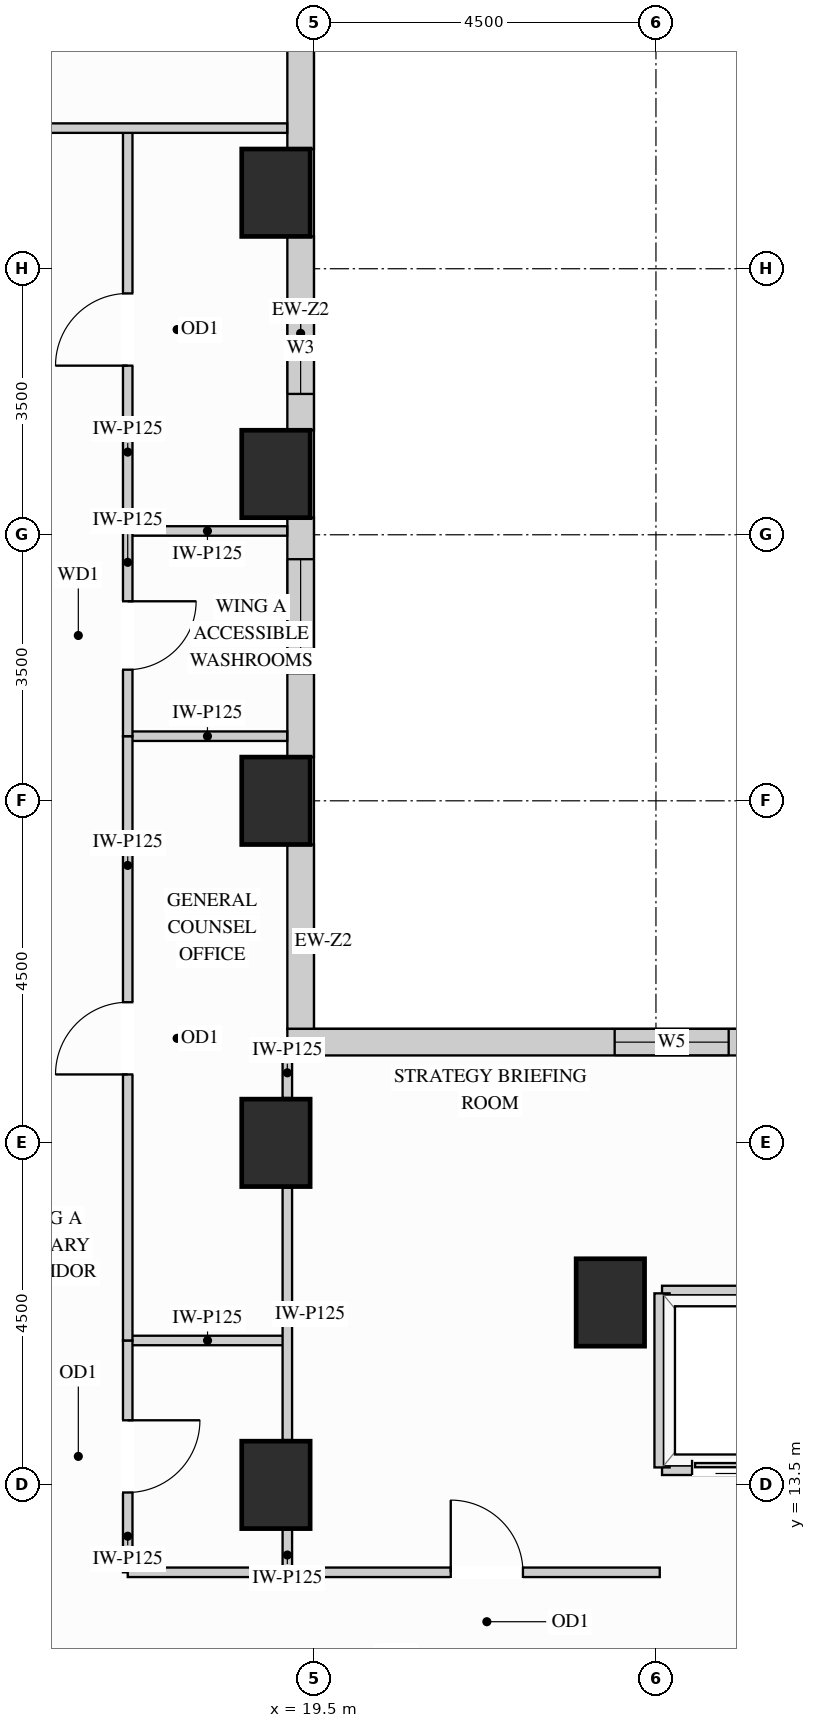
"""IFC4 building model, lengths in metres.
Left out: names, types, materials, properties, quantities, classifications, styles, units other than length and angle.
Written with IfcOpenShell. Run it as: python <this file> out.ifc"""

import sys

from ifc_helpers import new_model, si_unit, direction, frame, frame_2d, origin, origin_2d, place, context, subcontext, project, spatial, rectangle, extrude, source, transform, mapped, element, fill, save


model = new_model("IFC4")
c1 = context("Model", 3, precision=1e-05, world=origin(), true_north=direction((0.0, 1.0)))
c2 = subcontext(c1, "Body", "Model", "MODEL_VIEW")
j1 = project(units=[si_unit("LENGTHUNIT", "METRE"), si_unit("PLANEANGLEUNIT", "RADIAN")], contexts=[c1])
p1 = place(None, origin())
s1 = spatial("IfcSite", under=j1, at=p1, CompositionType="ELEMENT")
p2 = place(p1, origin())
s2 = spatial("IfcBuilding", under=s1, at=p2, CompositionType="ELEMENT")
p3 = place(p2, frame((0.0, 0.0, 88.2)))
s3 = spatial("IfcBuildingStorey", under=s2, at=p3, CompositionType="ELEMENT", Elevation=88.2)
m1 = source(origin(), c2, "Body", "SweptSolid", [
    extrude(rectangle(XDim=0.9, YDim=1.15, at=origin_2d()), origin(), (0.0, 0.0, 1.0), 3.38),
])
for number, where, z_axis, x_axis in (
    (1, (19.0, 13.5, 0.0), (0.0, 0.0, 1.0), (1.0, 0.0, 0.0)),
    (2, (19.0, 18.0, 0.0), (0.0, 0.0, 1.0), (1.0, 0.0, 0.0)),
    (3, (19.0, 22.5, 0.0), (0.0, 0.0, 1.0), (1.0, 0.0, 0.0)),
    (4, (19.0, 26.8, 0.0), (0.0, 0.0, 1.0), (1.0, 0.0, 0.0)),
    (5, (19.0, 30.5, 0.0), (0.0, 0.0, 1.0), (1.0, 0.0, 0.0)),
    (6, (23.4, 15.9, 0.0), (0.0, 0.0, 1.0), (1.0, 0.0, 0.0)),
):
    element("IfcColumn", number, at=place(p3, frame(where, z_axis=z_axis, x_axis=x_axis)), inside=s3, PredefinedType="COLUMN", context=c2, shape_type="MappedRepresentation", body=[
        mapped(m1, transform((0.0, 0.0, 0.0), x_axis=(1.0, 0.0, 0.0), y_axis=(0.0, 1.0, 0.0), z_axis=(0.0, 0.0, 1.0))),
    ])
m2 = source(origin(), c2, "Body", "SweptSolid", [
    extrude(rectangle(XDim=2.429, YDim=0.35, at=frame_2d((1.214, 0.0))), origin(), (0.0, 0.0, 1.0), 2.519),
])
p4 = place(p3, frame((19.325, 19.498, 0.0), z_axis=(0.0, 0.0, 1.0), x_axis=(0.0, 1.0, 0.0)))
e7 = element("IfcWall", 7, at=p4, inside=s3, PredefinedType="SOLIDWALL", context=c2, shape_type="MappedRepresentation", body=[
    mapped(m2, transform((0.0, 0.0, 0.0), x_axis=(1.0, 0.0, 0.0), y_axis=(0.0, 1.0, 0.0), z_axis=(0.0, 0.0, 1.0))),
])
p5 = place(p3, frame((19.325, 23.073, 0.0), z_axis=(0.0, 0.0, 1.0), x_axis=(0.0, 1.0, 0.0)))
e8 = element("IfcWall", 8, at=p5, inside=s3, PredefinedType="SOLIDWALL", context=c2, shape_type="SweptSolid", body=[
    extrude(rectangle(XDim=3.154, YDim=0.35, at=frame_2d((1.577, 0.0))), origin(), (0.0, 0.0, 1.0), 2.519),
])
p6 = place(p5, frame((1.105, 0.0, 0.78)))
e9 = element("IfcOpeningElement", 9, at=p6, cuts=e8, PredefinedType="OPENING", context=c2, shape_type="SweptSolid", body=[
    extrude(rectangle(XDim=1.5, YDim=1.559, at=frame_2d((0.75, 0.78))), frame((0.0, 0.185, 0.0), z_axis=(0.0, -1.0, 0.0), x_axis=(1.0, 0.0, 0.0)), (0.0, 0.0, 1.0), 0.37),
])
p7 = place(p3, frame((19.325, 27.373, 0.0), z_axis=(0.0, 0.0, 1.0), x_axis=(0.0, 1.0, 0.0)))
e10 = element("IfcWall", 10, at=p7, inside=s3, PredefinedType="SOLIDWALL", context=c2, shape_type="SweptSolid", body=[
    extrude(rectangle(XDim=2.554, YDim=0.35, at=frame_2d((1.277, 0.0))), origin(), (0.0, 0.0, 1.0), 2.519),
])
p8 = place(p7, frame((0.48, 0.0, 0.78)))
e11 = element("IfcOpeningElement", 11, at=p8, cuts=e10, PredefinedType="OPENING", context=c2, shape_type="SweptSolid", body=[
    extrude(rectangle(XDim=1.2, YDim=1.559, at=frame_2d((0.6, 0.78))), frame((0.0, 0.185, 0.0), z_axis=(0.0, -1.0, 0.0), x_axis=(1.0, 0.0, 0.0)), (0.0, 0.0, 1.0), 0.37),
])
m3 = source(origin(), c2, "Body", "SweptSolid", [
    extrude(rectangle(XDim=3.354, YDim=0.35, at=frame_2d((1.677, 0.0))), origin(), (0.0, 0.0, 1.0), 2.519),
])
p9 = place(p3, frame((19.325, 31.073, 0.0), z_axis=(0.0, 0.0, 1.0), x_axis=(0.0, 1.0, 0.0)))
e12 = element("IfcWall", 12, at=p9, inside=s3, PredefinedType="SOLIDWALL", context=c2, shape_type="MappedRepresentation", body=[
    mapped(m3, transform((0.0, 0.0, 0.0), x_axis=(1.0, 0.0, 0.0), y_axis=(0.0, 1.0, 0.0), z_axis=(0.0, 0.0, 1.0))),
])
p10 = place(p3, frame((34.75, 19.325, 0.0), z_axis=(0.0, 0.0, 1.0), x_axis=(-1.0, 0.0, 0.0)))
e13 = element("IfcWall", 13, at=p10, inside=s3, PredefinedType="SOLIDWALL", context=c2, shape_type="SweptSolid", body=[
    extrude(rectangle(XDim=15.6, YDim=0.35, at=frame_2d((7.8, 0.0))), origin(), (0.0, 0.0, 1.0), 3.365),
])
p11 = place(p10, frame((4.307, 0.0, 0.78)))
e14 = element("IfcOpeningElement", 14, at=p11, cuts=e13, PredefinedType="OPENING", context=c2, shape_type="SweptSolid", body=[
    extrude(rectangle(XDim=1.5, YDim=2.0, at=frame_2d((0.75, 1.0))), frame((0.0, 0.185, 0.0), z_axis=(0.0, -1.0, 0.0), x_axis=(1.0, 0.0, 0.0)), (0.0, 0.0, 1.0), 0.37),
])
p12 = place(p10, frame((9.793, 0.0, 0.78)))
e15 = element("IfcOpeningElement", 15, at=p12, cuts=e13, PredefinedType="OPENING", context=c2, shape_type="SweptSolid", body=[
    extrude(rectangle(XDim=1.5, YDim=2.0, at=frame_2d((0.75, 1.0))), frame((0.0, 0.185, 0.0), z_axis=(0.0, -1.0, 0.0), x_axis=(1.0, 0.0, 0.0)), (0.0, 0.0, 1.0), 0.37),
])
m4 = source(origin(), c2, "Body", "SweptSolid", [
    extrude(rectangle(XDim=2.1, YDim=0.125, at=frame_2d((1.05, 0.0))), origin(), (0.0, 0.0, 1.0), 3.365),
])
p13 = place(p3, frame((17.05, 15.4, 0.0), z_axis=(0.0, 0.0, 1.0), x_axis=(1.0, 0.0, 0.0)))
e16 = element("IfcWall", 16, at=p13, inside=s3, PredefinedType="PARTITIONING", context=c2, shape_type="MappedRepresentation", body=[
    mapped(m4, transform((0.0, 0.0, 0.0), x_axis=(1.0, 0.0, 0.0), y_axis=(0.0, 1.0, 0.0), z_axis=(0.0, 0.0, 1.0))),
])
m5 = source(origin(), c2, "Body", "SweptSolid", [
    extrude(rectangle(XDim=2.098, YDim=0.125, at=frame_2d((1.049, 0.0))), origin(), (0.0, 0.0, 1.0), 3.365),
])
for number, where, z_axis, x_axis in (
    (17, (17.05, 23.35, 0.0), (0.0, 0.0, 1.0), (1.0, 0.0, 0.0)),
    (18, (17.05, 26.05, 0.0), (0.0, 0.0, 1.0), (1.0, 0.0, 0.0)),
):
    element("IfcWall", number, at=place(p3, frame(where, z_axis=z_axis, x_axis=x_axis)), inside=s3, PredefinedType="PARTITIONING", context=c2, shape_type="MappedRepresentation", body=[
        mapped(m5, transform((0.0, 0.0, 0.0), x_axis=(1.0, 0.0, 0.0), y_axis=(0.0, 1.0, 0.0), z_axis=(0.0, 0.0, 1.0))),
    ])
m6 = source(origin(), c2, "Body", "SweptSolid", [
    extrude(rectangle(XDim=0.56, YDim=0.125, at=frame_2d((0.28, 0.0))), origin(), (0.0, 0.0, 1.0), 2.677),
])
p14 = place(p3, frame((19.15, 12.35, 0.0), z_axis=(0.0, 0.0, 1.0), x_axis=(0.0, 1.0, 0.0)))
e19 = element("IfcWall", 19, at=p14, inside=s3, PredefinedType="PARTITIONING", context=c2, shape_type="MappedRepresentation", body=[
    mapped(m6, transform((0.0, 0.0, 0.0), x_axis=(1.0, 0.0, 0.0), y_axis=(0.0, 1.0, 0.0), z_axis=(0.0, 0.0, 1.0))),
])
m7 = source(origin(), c2, "Body", "SweptSolid", [
    extrude(rectangle(XDim=3.32, YDim=0.125, at=frame_2d((1.66, 0.0))), origin(), (0.0, 0.0, 1.0), 2.677),
])
p15 = place(p3, frame((19.15, 14.09, 0.0), z_axis=(0.0, 0.0, 1.0), x_axis=(0.0, 1.0, 0.0)))
e20 = element("IfcWall", 20, at=p15, inside=s3, PredefinedType="PARTITIONING", context=c2, shape_type="MappedRepresentation", body=[
    mapped(m7, transform((0.0, 0.0, 0.0), x_axis=(1.0, 0.0, 0.0), y_axis=(0.0, 1.0, 0.0), z_axis=(0.0, 0.0, 1.0))),
])
m8 = source(origin(), c2, "Body", "SweptSolid", [
    extrude(rectangle(XDim=0.558, YDim=0.125, at=frame_2d((0.279, 0.0))), origin(), (0.0, 0.0, 1.0), 2.519),
])
p16 = place(p3, frame((19.15, 18.59, 0.0), z_axis=(0.0, 0.0, 1.0), x_axis=(0.0, 1.0, 0.0)))
e21 = element("IfcWall", 21, at=p16, inside=s3, PredefinedType="PARTITIONING", context=c2, shape_type="MappedRepresentation", body=[
    mapped(m8, transform((0.0, 0.0, 0.0), x_axis=(1.0, 0.0, 0.0), y_axis=(0.0, 1.0, 0.0), z_axis=(0.0, 0.0, 1.0))),
])
p17 = place(p3, frame((17.05, 12.35, 0.0), z_axis=(0.0, 0.0, 1.0), x_axis=(0.0, 1.0, 0.0)))
e22 = element("IfcWall", 22, at=p17, inside=s3, PredefinedType="PARTITIONING", context=c2, shape_type="SweptSolid", body=[
    extrude(rectangle(XDim=3.05, YDim=0.125, at=frame_2d((1.525, 0.0))), origin(), (0.0, 0.0, 1.0), 3.365),
])
p18 = place(p17, frame((1.05, 0.0, 0.0)))
e23 = element("IfcOpeningElement", 23, at=p18, cuts=e22, PredefinedType="OPENING", context=c2, shape_type="SweptSolid", body=[
    extrude(rectangle(XDim=0.95, YDim=2.15, at=frame_2d((0.475, 1.075))), frame((0.0, 0.073, 0.0), z_axis=(0.0, -1.0, 0.0), x_axis=(1.0, 0.0, 0.0)), (0.0, 0.0, 1.0), 0.145),
])
p19 = place(p3, frame((17.05, 15.4, 0.0), z_axis=(0.0, 0.0, 1.0), x_axis=(0.0, 1.0, 0.0)))
e24 = element("IfcWall", 24, at=p19, inside=s3, PredefinedType="PARTITIONING", context=c2, shape_type="SweptSolid", body=[
    extrude(rectangle(XDim=7.95, YDim=0.125, at=frame_2d((3.975, 0.0))), origin(), (0.0, 0.0, 1.0), 3.365),
])
p20 = place(p19, frame((3.5, 0.0, 0.0)))
e25 = element("IfcOpeningElement", 25, at=p20, cuts=e24, PredefinedType="OPENING", context=c2, shape_type="SweptSolid", body=[
    extrude(rectangle(XDim=0.95, YDim=2.15, at=frame_2d((0.475, 1.075))), frame((0.0, 0.073, 0.0), z_axis=(0.0, -1.0, 0.0), x_axis=(1.0, 0.0, 0.0)), (0.0, 0.0, 1.0), 0.145),
])
p21 = place(p3, frame((17.05, 26.05, 0.0), z_axis=(0.0, 0.0, 1.0), x_axis=(0.0, 1.0, 0.0)))
e26 = element("IfcWall", 26, at=p21, inside=s3, PredefinedType="PARTITIONING", context=c2, shape_type="SweptSolid", body=[
    extrude(rectangle(XDim=5.3, YDim=0.125, at=frame_2d((2.65, 0.0))), origin(), (0.0, 0.0, 1.0), 3.365),
])
p22 = place(p21, frame((2.175, 0.0, 0.0)))
e27 = element("IfcOpeningElement", 27, at=p22, cuts=e26, PredefinedType="OPENING", context=c2, shape_type="SweptSolid", body=[
    extrude(rectangle(XDim=0.95, YDim=2.15, at=frame_2d((0.475, 1.075))), frame((0.0, 0.073, 0.0), z_axis=(0.0, -1.0, 0.0), x_axis=(1.0, 0.0, 0.0)), (0.0, 0.0, 1.0), 0.145),
])
p23 = place(p3, frame((17.05, 23.35, 0.0), z_axis=(0.0, 0.0, 1.0), x_axis=(0.0, 1.0, 0.0)))
e28 = element("IfcWall", 28, at=p23, inside=s3, PredefinedType="PARTITIONING", context=c2, shape_type="SweptSolid", body=[
    extrude(rectangle(XDim=2.7, YDim=0.125, at=frame_2d((1.35, 0.0))), origin(), (0.0, 0.0, 1.0), 3.365),
])
p24 = place(p23, frame((0.875, 0.0, 0.0)))
e29 = element("IfcOpeningElement", 29, at=p24, cuts=e28, PredefinedType="OPENING", context=c2, shape_type="SweptSolid", body=[
    extrude(rectangle(XDim=0.9, YDim=2.15, at=frame_2d((0.45, 1.075))), frame((0.0, 0.073, 0.0), z_axis=(0.0, -1.0, 0.0), x_axis=(1.0, 0.0, 0.0)), (0.0, 0.0, 1.0), 0.145),
])
m9 = source(origin(), c2, "Body", "SweptSolid", [
    extrude(rectangle(XDim=5.798, YDim=0.125, at=frame_2d((2.899, 0.0))), origin(), (0.0, 0.0, 1.0), 3.365),
])
p25 = place(p3, frame((13.35, 31.35, 0.0), z_axis=(0.0, 0.0, 1.0), x_axis=(1.0, 0.0, 0.0)))
e30 = element("IfcWall", 30, at=p25, inside=s3, PredefinedType="PARTITIONING", context=c2, shape_type="MappedRepresentation", body=[
    mapped(m9, transform((0.0, 0.0, 0.0), x_axis=(1.0, 0.0, 0.0), y_axis=(0.0, 1.0, 0.0), z_axis=(0.0, 0.0, 1.0))),
])
m10 = source(origin(), c2, "Body", "SweptSolid", [
    extrude(rectangle(XDim=2.45, YDim=0.125, at=frame_2d((1.225, 0.0))), origin(), (0.0, 0.0, 1.0), 3.365),
])
p26 = place(p3, frame((17.05, 12.35, 0.0), z_axis=(0.0, 0.0, 1.0), x_axis=(1.0, 0.0, 0.0)))
e31 = element("IfcWall", 31, at=p26, inside=s3, PredefinedType="PARTITIONING", context=c2, shape_type="MappedRepresentation", body=[
    mapped(m10, transform((0.0, 0.0, 0.0), x_axis=(1.0, 0.0, 0.0), y_axis=(0.0, 1.0, 0.0), z_axis=(0.0, 0.0, 1.0))),
])
p27 = place(p3, frame((19.5, 12.35, 0.0), z_axis=(0.0, 0.0, 1.0), x_axis=(1.0, 0.0, 0.0)))
e32 = element("IfcWall", 32, at=p27, inside=s3, PredefinedType="PARTITIONING", context=c2, shape_type="SweptSolid", body=[
    extrude(rectangle(XDim=4.55, YDim=0.125, at=frame_2d((2.275, 0.0))), origin(), (0.0, 0.0, 1.0), 3.365),
])
p28 = place(p27, frame((1.8, 0.0, 0.0)))
e33 = element("IfcOpeningElement", 33, at=p28, cuts=e32, PredefinedType="OPENING", context=c2, shape_type="SweptSolid", body=[
    extrude(rectangle(XDim=0.95, YDim=2.15, at=frame_2d((0.475, 1.075))), frame((0.0, 0.073, 0.0), z_axis=(0.0, -1.0, 0.0), x_axis=(1.0, 0.0, 0.0)), (0.0, 0.0, 1.0), 0.145),
])
m11 = source(origin(), c2, "Body", "SweptSolid", [
    extrude(rectangle(XDim=1.89, YDim=0.2, at=frame_2d((0.945, 0.0))), origin(), (0.0, 0.0, 1.0), 2.677),
])
p29 = place(p3, frame((24.08, 16.02, 0.0), z_axis=(0.0, 0.0, 1.0), x_axis=(1.0, 0.0, 0.0)))
e34 = element("IfcWall", 34, at=p29, inside=s3, PredefinedType="PARTITIONING", context=c2, shape_type="MappedRepresentation", body=[
    mapped(m11, transform((0.0, 0.0, 0.0), x_axis=(1.0, 0.0, 0.0), y_axis=(0.0, 1.0, 0.0), z_axis=(0.0, 0.0, 1.0))),
])
p30 = place(p3, frame((24.08, 13.73, 0.0), z_axis=(0.0, 0.0, 1.0), x_axis=(1.0, 0.0, 0.0)))
e35 = element("IfcWall", 35, at=p30, inside=s3, PredefinedType="PARTITIONING", context=c2, shape_type="SweptSolid", body=[
    extrude(rectangle(XDim=1.89, YDim=0.2, at=frame_2d((0.945, 0.0))), origin(), (0.0, 0.0, 1.0), 2.446),
])
p31 = place(p30, frame((0.395, 0.0, 0.0)))
e36 = element("IfcOpeningElement", 36, at=p31, cuts=e35, PredefinedType="OPENING", context=c2, shape_type="SweptSolid", body=[
    extrude(rectangle(XDim=1.1, YDim=2.2, at=frame_2d((0.55, 1.1))), frame((0.0, 0.11, 0.0), z_axis=(0.0, -1.0, 0.0), x_axis=(1.0, 0.0, 0.0)), (0.0, 0.0, 1.0), 0.22),
])
m12 = source(origin(), c2, "Body", "SweptSolid", [
    extrude(rectangle(XDim=2.29, YDim=0.2, at=frame_2d((1.145, 0.0))), origin(), (0.0, 0.0, 1.0), 3.365),
])
p32 = place(p3, frame((24.08, 13.73, 0.0), z_axis=(0.0, 0.0, 1.0), x_axis=(0.0, 1.0, 0.0)))
e37 = element("IfcWall", 37, at=p32, inside=s3, PredefinedType="PARTITIONING", context=c2, shape_type="MappedRepresentation", body=[
    mapped(m12, transform((0.0, 0.0, 0.0), x_axis=(1.0, 0.0, 0.0), y_axis=(0.0, 1.0, 0.0), z_axis=(0.0, 0.0, 1.0))),
])
m13 = source(origin(), c2, "Body", "SweptSolid", [
    extrude(rectangle(XDim=1.1, YDim=2.2, at=frame_2d((0.55, 1.1))), frame((0.0, 0.025, 0.0), z_axis=(0.0, -1.0, 0.0), x_axis=(1.0, 0.0, 0.0)), (0.0, 0.0, 1.0), 0.05),
])
p33 = place(p31, origin())
e38 = element("IfcDoor", 38, at=p33, inside=s3, OperationType="SLIDING_TO_LEFT", PredefinedType="DOOR", context=c2, shape_type="MappedRepresentation", body=[
    mapped(m13, transform((0.0, 0.0, 0.0), x_axis=(1.0, 0.0, 0.0), y_axis=(0.0, 1.0, 0.0), z_axis=(0.0, 0.0, 1.0))),
])
fill(e36, e38)
m14 = source(origin(), c2, "Body", "SweptSolid", [
    extrude(rectangle(XDim=0.95, YDim=2.15, at=frame_2d((0.475, 1.075))), frame((0.0, 0.025, 0.0), z_axis=(0.0, -1.0, 0.0), x_axis=(1.0, 0.0, 0.0)), (0.0, 0.0, 1.0), 0.05),
])
p34 = place(p18, origin())
e39 = element("IfcDoor", 39, at=p34, inside=s3, OperationType="SINGLE_SWING_RIGHT", PredefinedType="DOOR", context=c2, shape_type="MappedRepresentation", body=[
    mapped(m14, transform((0.0, 0.0, 0.0), x_axis=(1.0, 0.0, 0.0), y_axis=(0.0, 1.0, 0.0), z_axis=(0.0, 0.0, 1.0))),
])
fill(e23, e39)
p35 = place(p20, origin())
e40 = element("IfcDoor", 40, at=p35, inside=s3, OperationType="SINGLE_SWING_LEFT", PredefinedType="DOOR", context=c2, shape_type="MappedRepresentation", body=[
    mapped(m14, transform((0.0, 0.0, 0.0), x_axis=(1.0, 0.0, 0.0), y_axis=(0.0, 1.0, 0.0), z_axis=(0.0, 0.0, 1.0))),
])
fill(e25, e40)
p36 = place(p22, origin())
e41 = element("IfcDoor", 41, at=p36, inside=s3, OperationType="SINGLE_SWING_LEFT", PredefinedType="DOOR", context=c2, shape_type="MappedRepresentation", body=[
    mapped(m14, transform((0.0, 0.0, 0.0), x_axis=(1.0, 0.0, 0.0), y_axis=(0.0, 1.0, 0.0), z_axis=(0.0, 0.0, 1.0))),
])
fill(e27, e41)
p37 = place(p28, origin())
e42 = element("IfcDoor", 42, at=p37, inside=s3, OperationType="SINGLE_SWING_LEFT", PredefinedType="DOOR", context=c2, shape_type="MappedRepresentation", body=[
    mapped(m14, transform((0.0, 0.0, 0.0), x_axis=(1.0, 0.0, 0.0), y_axis=(0.0, 1.0, 0.0), z_axis=(0.0, 0.0, 1.0))),
])
fill(e33, e42)
m15 = source(origin(), c2, "Body", "SweptSolid", [
    extrude(rectangle(XDim=0.9, YDim=2.15, at=frame_2d((0.45, 1.075))), frame((0.0, 0.025, 0.0), z_axis=(0.0, -1.0, 0.0), x_axis=(1.0, 0.0, 0.0)), (0.0, 0.0, 1.0), 0.05),
])
p38 = place(p24, origin())
e43 = element("IfcDoor", 43, at=p38, inside=s3, OperationType="SINGLE_SWING_RIGHT", PredefinedType="DOOR", context=c2, shape_type="MappedRepresentation", body=[
    mapped(m15, transform((0.0, 0.0, 0.0), x_axis=(1.0, 0.0, 0.0), y_axis=(0.0, 1.0, 0.0), z_axis=(0.0, 0.0, 1.0))),
])
fill(e29, e43)
m16 = source(origin(), c2, "Body", "SweptSolid", [
    extrude(rectangle(XDim=1.2, YDim=1.559, at=frame_2d((0.6, 0.78))), frame((0.0, 0.03, 0.0), z_axis=(0.0, -1.0, 0.0), x_axis=(1.0, 0.0, 0.0)), (0.0, 0.0, 1.0), 0.06),
])
p39 = place(p8, origin())
e44 = element("IfcWindow", 44, at=p39, inside=s3, PartitioningType="SINGLE_PANEL", PredefinedType="WINDOW", context=c2, shape_type="MappedRepresentation", body=[
    mapped(m16, transform((0.0, 0.0, 0.0), x_axis=(1.0, 0.0, 0.0), y_axis=(0.0, 1.0, 0.0), z_axis=(0.0, 0.0, 1.0))),
])
fill(e11, e44)
m17 = source(origin(), c2, "Body", "SweptSolid", [
    extrude(rectangle(XDim=1.5, YDim=1.559, at=frame_2d((0.75, 0.78))), frame((0.0, 0.03, 0.0), z_axis=(0.0, -1.0, 0.0), x_axis=(1.0, 0.0, 0.0)), (0.0, 0.0, 1.0), 0.06),
])
p40 = place(p6, origin())
e45 = element("IfcWindow", 45, at=p40, inside=s3, PartitioningType="SINGLE_PANEL", PredefinedType="WINDOW", context=c2, shape_type="MappedRepresentation", body=[
    mapped(m17, transform((0.0, 0.0, 0.0), x_axis=(1.0, 0.0, 0.0), y_axis=(0.0, 1.0, 0.0), z_axis=(0.0, 0.0, 1.0))),
])
fill(e9, e45)
m18 = source(origin(), c2, "Body", "SweptSolid", [
    extrude(rectangle(XDim=1.5, YDim=2.0, at=frame_2d((0.75, 1.0))), frame((0.0, 0.03, 0.0), z_axis=(0.0, -1.0, 0.0), x_axis=(1.0, 0.0, 0.0)), (0.0, 0.0, 1.0), 0.06),
])
p41 = place(p12, origin())
e46 = element("IfcWindow", 46, at=p41, inside=s3, PartitioningType="SINGLE_PANEL", PredefinedType="WINDOW", context=c2, shape_type="MappedRepresentation", body=[
    mapped(m18, transform((0.0, 0.0, 0.0), x_axis=(1.0, 0.0, 0.0), y_axis=(0.0, 1.0, 0.0), z_axis=(0.0, 0.0, 1.0))),
])
fill(e15, e46)
save(model, sys.argv[1])
